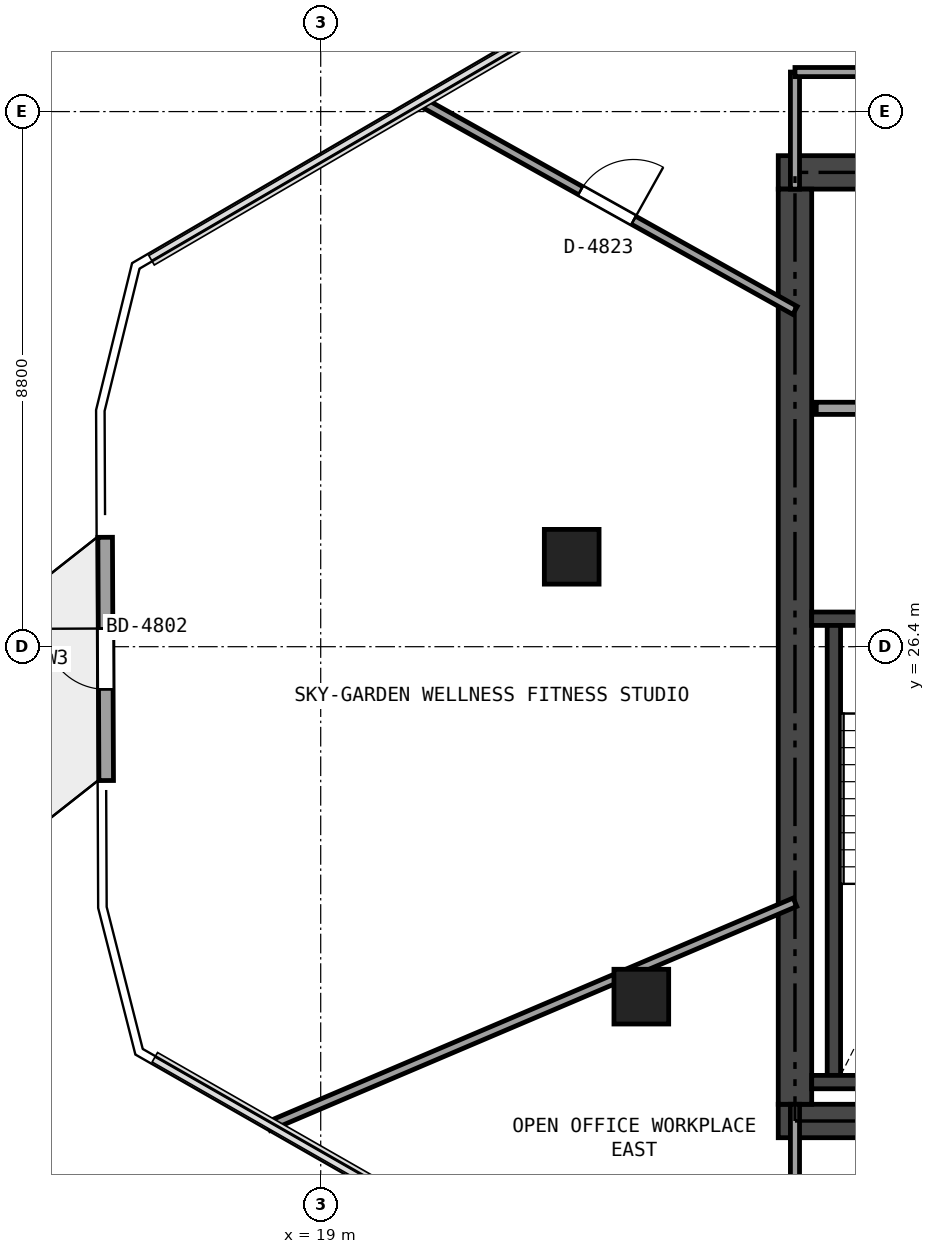
"""IFC4 building model, lengths in metres.
Left out: names, types, materials, properties, quantities, classifications, styles, units other than length and angle.
Written with IfcOpenShell. Run it as: python <this file> out.ifc"""

import sys

from ifc_helpers import new_model, si_unit, direction, frame, frame_2d, origin, origin_2d, place, context, subcontext, project, spatial, rectangle, extrude, element, fill, save


model = new_model("IFC4")
c1 = context("Model", 3, precision=1e-05, world=origin(), true_north=direction((0.0, 1.0)))
c2 = subcontext(c1, "Body", "Model", "MODEL_VIEW")
j1 = project(units=[si_unit("LENGTHUNIT", "METRE"), si_unit("PLANEANGLEUNIT", "RADIAN")], contexts=[c1])
p1 = place(None, origin())
s1 = spatial("IfcSite", under=j1, at=p1, CompositionType="ELEMENT")
p2 = place(p1, origin())
s2 = spatial("IfcBuilding", under=s1, at=p2, CompositionType="ELEMENT")
p3 = place(p2, frame((0.0, 0.0, 180.6)))
s3 = spatial("IfcBuildingStorey", under=s2, at=p3, CompositionType="ELEMENT", Elevation=180.6)
p4 = place(p3, frame((26.525, 18.6, 0.0), z_axis=(0.0, 0.0, 1.0), x_axis=(1.0, 0.0, 0.0)))
e1 = element("IfcWall", 1, at=p4, inside=s3, PredefinedType="SHEAR", context=c2, shape_type="SweptSolid", body=[
    extrude(rectangle(XDim=21.35, YDim=0.55, at=frame_2d((10.675, 0.0))), origin(), (0.0, 0.0, 1.0), 3.32),
])
p5 = place(p4, frame((12.4, 0.0, 0.0)))
e2 = element("IfcOpeningElement", 2, at=p5, cuts=e1, PredefinedType="OPENING", context=c2, shape_type="SweptSolid", body=[
    extrude(rectangle(XDim=1.15, YDim=2.15, at=frame_2d((0.575, 1.075))), frame((0.0, 0.285, 0.0), z_axis=(0.0, -1.0, 0.0), x_axis=(1.0, 0.0, 0.0)), (0.0, 0.0, 1.0), 0.57),
])
p6 = place(p4, frame((5.225, 0.0, 0.0)))
e3 = element("IfcOpeningElement", 3, at=p6, cuts=e1, PredefinedType="OPENING", context=c2, shape_type="SweptSolid", body=[
    extrude(rectangle(XDim=0.9, YDim=2.1, at=frame_2d((0.45, 1.05))), frame((0.0, 0.285, 0.0), z_axis=(0.0, -1.0, 0.0), x_axis=(1.0, 0.0, 0.0)), (0.0, 0.0, 1.0), 0.57),
])
p7 = place(p3, frame((26.525, 34.2, 0.0), z_axis=(0.0, 0.0, 1.0), x_axis=(1.0, 0.0, 0.0)))
e4 = element("IfcWall", 4, at=p7, inside=s3, PredefinedType="SHEAR", context=c2, shape_type="SweptSolid", body=[
    extrude(rectangle(XDim=21.35, YDim=0.55, at=frame_2d((10.675, 0.0))), origin(), (0.0, 0.0, 1.0), 3.32),
])
p8 = place(p7, frame((9.675, 0.0, 0.0)))
e5 = element("IfcOpeningElement", 5, at=p8, cuts=e4, PredefinedType="OPENING", context=c2, shape_type="SweptSolid", body=[
    extrude(rectangle(XDim=1.1, YDim=2.15, at=frame_2d((0.55, 1.075))), frame((0.0, 0.285, 0.0), z_axis=(0.0, -1.0, 0.0), x_axis=(1.0, 0.0, 0.0)), (0.0, 0.0, 1.0), 0.57),
])
p9 = place(p7, frame((1.925, 0.0, 0.0)))
e6 = element("IfcOpeningElement", 6, at=p9, cuts=e4, PredefinedType="OPENING", context=c2, shape_type="SweptSolid", body=[
    extrude(rectangle(XDim=0.9, YDim=2.1, at=frame_2d((0.45, 1.05))), frame((0.0, 0.285, 0.0), z_axis=(0.0, -1.0, 0.0), x_axis=(1.0, 0.0, 0.0)), (0.0, 0.0, 1.0), 0.57),
])
p10 = place(p7, frame((6.225, 0.0, 0.0)))
e7 = element("IfcOpeningElement", 7, at=p10, cuts=e4, PredefinedType="OPENING", context=c2, shape_type="SweptSolid", body=[
    extrude(rectangle(XDim=0.9, YDim=2.1, at=frame_2d((0.45, 1.05))), frame((0.0, 0.285, 0.0), z_axis=(0.0, -1.0, 0.0), x_axis=(1.0, 0.0, 0.0)), (0.0, 0.0, 1.0), 0.57),
])
p11 = place(p3, frame((26.8, 18.875, 0.0), z_axis=(0.0, 0.0, 1.0), x_axis=(0.0, 1.0, 0.0)))
e8 = element("IfcWall", 8, at=p11, inside=s3, PredefinedType="SHEAR", context=c2, shape_type="SweptSolid", body=[
    extrude(rectangle(XDim=15.05, YDim=0.55, at=frame_2d((7.525, 0.0))), origin(), (0.0, 0.0, 1.0), 3.32),
])
p12 = place(p3, frame((27.075, 26.86, 0.0), z_axis=(0.0, 0.0, 1.0), x_axis=(1.0, 0.0, 0.0)))
e9 = element("IfcWall", 9, at=p12, inside=s3, PredefinedType="SHEAR", context=c2, shape_type="SweptSolid", body=[
    extrude(rectangle(XDim=3.475, YDim=0.22, at=frame_2d((1.738, 0.0))), origin(), (0.0, 0.0, 1.0), 3.32),
])
p13 = place(p3, frame((27.44, 19.35, 0.0), z_axis=(0.0, 0.0, 1.0), x_axis=(0.0, 1.0, 0.0)))
e10 = element("IfcWall", 10, at=p13, inside=s3, PredefinedType="SHEAR", context=c2, shape_type="SweptSolid", body=[
    extrude(rectangle(XDim=7.4, YDim=0.22, at=frame_2d((3.7, 0.0))), origin(), (0.0, 0.0, 1.0), 3.32),
])
p14 = place(p3, frame((27.075, 19.24, 0.0), z_axis=(0.0, 0.0, 1.0), x_axis=(1.0, 0.0, 0.0)))
e11 = element("IfcWall", 11, at=p14, inside=s3, PredefinedType="SHEAR", context=c2, shape_type="SweptSolid", body=[
    extrude(rectangle(XDim=3.475, YDim=0.22, at=frame_2d((1.738, 0.0))), origin(), (0.0, 0.0, 1.0), 3.32),
])
for number, where, z_axis, x_axis in (
    (12, (23.128, 27.879, 0.0), (0.0, 0.0, 1.0), (1.0, 0.0, 0.0)),
    (13, (24.273, 20.645, 0.0), (0.0, 0.0, 1.0), (1.0, 0.0, 0.0)),
):
    element("IfcColumn", number, at=place(p3, frame(where, z_axis=z_axis, x_axis=x_axis)), inside=s3, PredefinedType="COLUMN", context=c2, shape_type="SweptSolid", body=[
        extrude(rectangle(XDim=0.9, YDim=0.9, at=origin_2d()), origin(), (0.0, 0.0, 1.0), 3.32),
    ])
p15 = place(p3, frame((15.472, 24.199, 0.0), z_axis=(0.0, 0.0, 1.0), x_axis=(-0.004211388435, 0.999991132064, 0.0)))
e14 = element("IfcWall", 14, at=p15, inside=s3, PredefinedType="SOLIDWALL", context=c2, shape_type="SweptSolid", body=[
    extrude(rectangle(XDim=4.0, YDim=0.24, at=frame_2d((2.0, 0.0))), origin(), (0.0, 0.0, 1.0), 3.32),
])
p16 = place(p15, frame((1.5, 0.0, 0.0)))
e15 = element("IfcOpeningElement", 15, at=p16, cuts=e14, PredefinedType="OPENING", context=c2, shape_type="SweptSolid", body=[
    extrude(rectangle(XDim=1.0, YDim=2.15, at=frame_2d((0.5, 1.075))), frame((0.0, 0.13, 0.0), z_axis=(0.0, -1.0, 0.0), x_axis=(1.0, 0.0, 0.0)), (0.0, 0.0, 1.0), 0.26),
])
p17 = place(p3, frame((27.15, 30.32, 0.0), z_axis=(0.0, 0.0, 1.0), x_axis=(1.0, 0.0, 0.0)))
e16 = element("IfcWall", 16, at=p17, inside=s3, PredefinedType="SOLIDWALL", context=c2, shape_type="SweptSolid", body=[
    extrude(rectangle(XDim=3.45, YDim=0.2, at=frame_2d((1.725, 0.0))), origin(), (0.0, 0.0, 1.0), 3.32),
])
p18 = place(p3, frame((20.62, 35.382, 0.0), z_axis=(0.0, 0.0, 1.0), x_axis=(0.873024248024, -0.487676801132, 0.0)))
e17 = element("IfcWall", 17, at=p18, inside=s3, PredefinedType="PARTITIONING", context=c2, shape_type="SweptSolid", body=[
    extrude(rectangle(XDim=7.079, YDim=0.15, at=frame_2d((3.54, 0.0))), origin(), (0.0, 0.0, 1.0), 2.905),
])
p19 = place(p18, frame((3.039, 0.0, 0.0)))
e18 = element("IfcOpeningElement", 18, at=p19, cuts=e17, PredefinedType="OPENING", context=c2, shape_type="SweptSolid", body=[
    extrude(rectangle(XDim=1.0, YDim=2.15, at=frame_2d((0.5, 1.075))), frame((0.0, 0.085, 0.0), z_axis=(0.0, -1.0, 0.0), x_axis=(1.0, 0.0, 0.0)), (0.0, 0.0, 1.0), 0.17),
])
p20 = place(p3, frame((26.8, 33.925, 0.0), z_axis=(0.0, 0.0, 1.0), x_axis=(0.0, 1.0, 0.0)))
e19 = element("IfcWall", 19, at=p20, inside=s3, PredefinedType="PARTITIONING", context=c2, shape_type="SweptSolid", body=[
    extrude(rectangle(XDim=1.925, YDim=0.15, at=frame_2d((0.962, 0.0))), origin(), (0.0, 0.0, 1.0), 2.905),
])
p21 = place(p3, frame((26.8, 35.85, 0.0), z_axis=(0.0, 0.0, 1.0), x_axis=(1.0, 0.0, 0.0)))
e20 = element("IfcWall", 20, at=p21, inside=s3, PredefinedType="PARTITIONING", context=c2, shape_type="SweptSolid", body=[
    extrude(rectangle(XDim=8.044, YDim=0.15, at=frame_2d((4.022, 0.0))), origin(), (0.0, 0.0, 1.0), 2.697),
])
p22 = place(p21, frame((3.522, 0.0, 0.0)))
e21 = element("IfcOpeningElement", 21, at=p22, cuts=e20, PredefinedType="OPENING", context=c2, shape_type="SweptSolid", body=[
    extrude(rectangle(XDim=1.0, YDim=2.15, at=frame_2d((0.5, 1.075))), frame((0.0, 0.085, 0.0), z_axis=(0.0, -1.0, 0.0), x_axis=(1.0, 0.0, 0.0)), (0.0, 0.0, 1.0), 0.17),
])
p23 = place(p3, frame((18.142, 18.514, 0.0), z_axis=(0.0, 0.0, 1.0), x_axis=(0.920160602649, 0.391541141302, 0.0)))
e22 = element("IfcWall", 22, at=p23, inside=s3, PredefinedType="PARTITIONING", context=c2, shape_type="SweptSolid", body=[
    extrude(rectangle(XDim=9.409, YDim=0.15, at=frame_2d((4.705, 0.0))), origin(), (0.0, 0.0, 1.0), 2.905),
])
p24 = place(p3, frame((26.8, 16.95, 0.0), z_axis=(0.0, 0.0, 1.0), x_axis=(0.0, 1.0, 0.0)))
e23 = element("IfcWall", 23, at=p24, inside=s3, PredefinedType="PARTITIONING", context=c2, shape_type="SweptSolid", body=[
    extrude(rectangle(XDim=1.925, YDim=0.15, at=frame_2d((0.962, 0.0))), origin(), (0.0, 0.0, 1.0), 2.905),
])
p25 = place(p16, origin())
e24 = element("IfcDoor", 24, at=p25, inside=s3, OperationType="SINGLE_SWING_RIGHT", PredefinedType="DOOR", context=c2, shape_type="SweptSolid", body=[
    extrude(rectangle(XDim=1.0, YDim=2.15, at=frame_2d((0.5, 1.075))), frame((0.0, 0.025, 0.0), z_axis=(0.0, -1.0, 0.0), x_axis=(1.0, 0.0, 0.0)), (0.0, 0.0, 1.0), 0.05),
])
fill(e15, e24)
p26 = place(p19, origin())
e25 = element("IfcDoor", 25, at=p26, inside=s3, OperationType="SINGLE_SWING_RIGHT", PredefinedType="DOOR", context=c2, shape_type="SweptSolid", body=[
    extrude(rectangle(XDim=1.0, YDim=2.15, at=frame_2d((0.5, 1.075))), frame((0.0, 0.025, 0.0), z_axis=(0.0, -1.0, 0.0), x_axis=(1.0, 0.0, 0.0)), (0.0, 0.0, 1.0), 0.05),
])
fill(e18, e25)
save(model, sys.argv[1])
